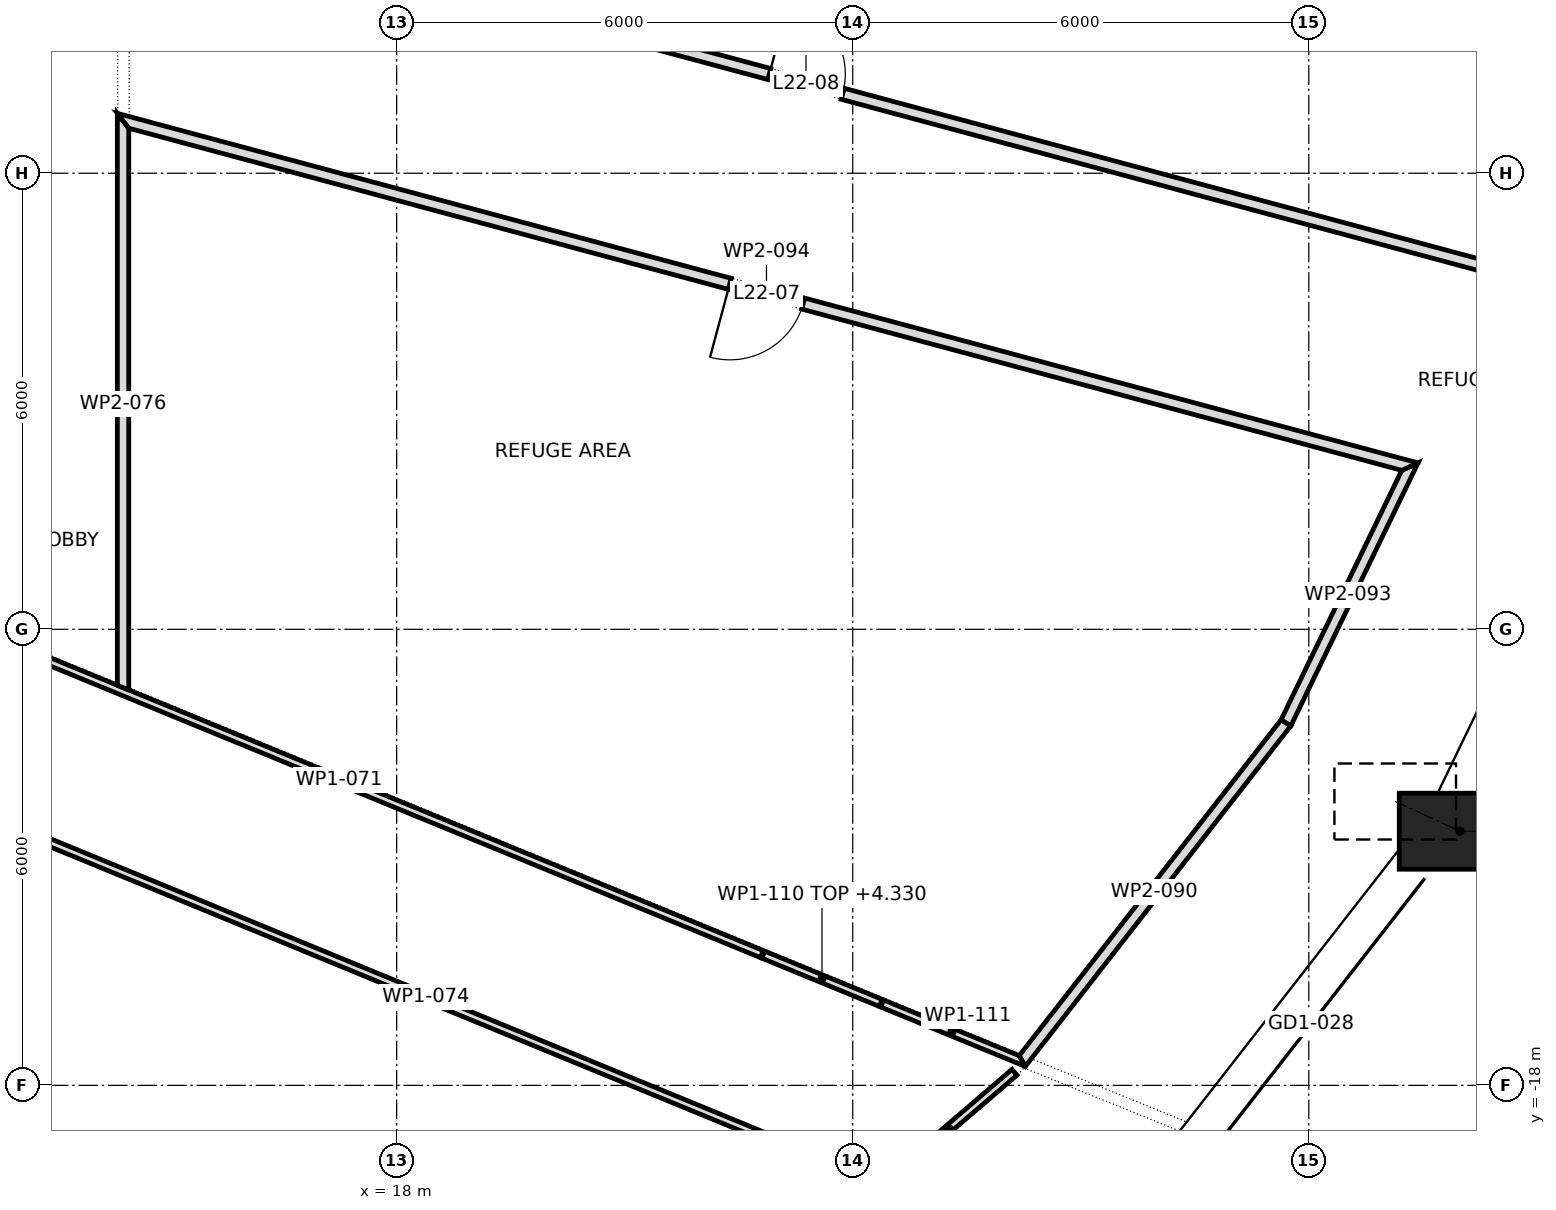
"""IFC4 building model, lengths in metres.
Left out: names, types, materials, properties, quantities, classifications, styles, units other than length and angle.
Written with IfcOpenShell. Run it as: python <this file> out.ifc"""

import sys

from ifc_helpers import new_model, si_unit, direction, frame, frame_2d, origin, origin_2d, place, context, subcontext, project, spatial, polyline, rectangle, outline, extrude, element, fill, save


model = new_model("IFC4")
c1 = context("Model", 3, precision=1e-05, world=origin(), true_north=direction((0.0, 1.0)))
c2 = subcontext(c1, "Body", "Model", "MODEL_VIEW")
j1 = project(units=[si_unit("LENGTHUNIT", "METRE"), si_unit("PLANEANGLEUNIT", "RADIAN")], contexts=[c1])
p1 = place(None, origin())
s1 = spatial("IfcSite", under=j1, at=p1, CompositionType="ELEMENT")
p2 = place(p1, origin())
s2 = spatial("IfcBuilding", under=s1, at=p2, CompositionType="ELEMENT")
p3 = place(p2, frame((0.0, 0.0, 99.1)))
s3 = spatial("IfcBuildingStorey", under=s2, at=p3, CompositionType="ELEMENT", Elevation=99.1)
p4 = place(p3, frame((28.04, -19.724, 0.086), z_axis=(-0.140981797412, 0.099170230088, 0.985032688931), x_axis=(-0.575341361803, -0.817913392358, 0.0)))
e1 = element("IfcColumn", 1, at=p4, inside=s3, PredefinedType="COLUMN", context=c2, shape_type="SweptSolid", body=[
    extrude(rectangle(XDim=1.6, YDim=1.0, at=origin_2d()), origin(), (0.0, 0.0, 1.0), 5.308),
])
p5 = place(p3, frame((31.99, -14.656, 0.088), z_axis=(-0.160721780276, 0.073644982891, 0.984248406572), x_axis=(-0.416565116305, -0.909105881555, 0.0)))
e2 = element("IfcColumn", 2, at=p5, inside=s3, PredefinedType="COLUMN", context=c2, shape_type="SweptSolid", body=[
    extrude(rectangle(XDim=1.6, YDim=1.0, at=origin_2d()), origin(), (0.0, 0.0, 1.0), 5.307),
])
p6 = place(p3, frame((9.76, -14.313, 0.0), z_axis=(0.0, 0.0, 1.0), x_axis=(0.493758679804, -0.869598968558, 0.0)))
e3 = element("IfcWall", 3, at=p6, inside=s3, PredefinedType="PARTITIONING", context=c2, shape_type="SweptSolid", body=[
    extrude(outline(polyline([(0.0, -0.075), (1.773, -0.075), (3.547, -0.075), (5.32, -0.075), (7.094, -0.075), (8.867, -0.075), (10.641, -0.075), (12.414, -0.075), (12.264, 0.075), (10.54, 0.075), (8.817, 0.075), (7.094, 0.075), (5.37, 0.075), (3.647, 0.075), (1.923, 0.075), (0.2, 0.075), (0.0, -0.075), (0.0, -0.075)])), origin(), (0.0, 0.0, 1.0), 5.1),
])
p7 = place(p3, frame((11.67, -11.7, 0.0), z_axis=(0.0, 0.0, 1.0), x_axis=(0.925020199912, -0.379917925025, 0.0)))
e4 = element("IfcWall", 4, at=p7, inside=s3, PredefinedType="PARTITIONING", context=c2, shape_type="SweptSolid", body=[
    extrude(outline(polyline([(0.0, 0.05), (0.0, -0.05), (1.721, -0.05), (3.442, -0.05), (5.163, -0.05), (6.884, -0.05), (8.605, -0.05), (10.326, -0.05), (12.047, -0.05), (12.047, 0.05), (10.326, 0.05), (8.605, 0.05), (6.884, 0.05), (5.163, 0.05), (3.442, 0.05), (1.721, 0.05), (0.0, 0.05)])), origin(), (0.0, 0.0, 1.0), 5.1),
])
p8 = place(p3, frame((12.441, -14.396, 0.0), z_axis=(0.0, 0.0, 1.0), x_axis=(0.924853269873, -0.380324110733, 0.0)))
e5 = element("IfcWall", 5, at=p8, inside=s3, PredefinedType="PARTITIONING", context=c2, shape_type="SweptSolid", body=[
    extrude(outline(polyline([(0.02, -0.05), (1.847, -0.05), (3.674, -0.05), (5.501, -0.05), (7.329, -0.05), (9.156, -0.05), (10.983, -0.05), (12.81, -0.05), (12.856, 0.041), (12.895, 0.021), (12.895, 0.037), (12.89, 0.04), (12.895, 0.049), (12.895, 0.05), (11.053, 0.05), (9.211, 0.05), (7.369, 0.05), (5.526, 0.05), (3.684, 0.05), (1.842, 0.05), (0.0, 0.05), (0.0, 0.05), (0.01, 0.0), (0.02, -0.05)])), origin(), (0.0, 0.0, 1.0), 5.1),
])
p9 = place(p3, frame((14.4, -5.212, 0.0), z_axis=(0.0, 0.0, 1.0), x_axis=(0.0, -1.0, 0.0)))
e6 = element("IfcWall", 6, at=p9, inside=s3, PredefinedType="PARTITIONING", context=c2, shape_type="SweptSolid", body=[
    extrude(outline(polyline([(0.0, -0.075), (1.881, -0.075), (3.762, -0.075), (5.643, -0.075), (7.524, -0.075), (7.585, 0.074), (7.585, 0.075), (5.738, 0.075), (3.89, 0.075), (2.043, 0.075), (0.196, 0.075), (0.098, 0.0), (0.0, -0.075), (0.0, -0.075), (0.0, -0.075), (0.0, -0.075)])), origin(), (0.0, 0.0, 1.0), 5.1),
])
p10 = place(p3, frame((14.344, -2.395, 0.0), z_axis=(0.0, 0.0, 1.0), x_axis=(0.96572282832, -0.259575458899, 0.0)))
e7 = element("IfcWall", 7, at=p10, inside=s3, PredefinedType="PARTITIONING", context=c2, shape_type="SweptSolid", body=[
    extrude(outline(polyline([(0.0, -0.075), (1.874, -0.075), (3.749, -0.075), (5.623, -0.075), (7.497, -0.075), (9.372, -0.075), (11.246, -0.075), (13.12, -0.075), (14.994, -0.075), (16.869, -0.075), (18.743, -0.075), (18.588, 0.075), (16.74, 0.075), (14.893, 0.075), (13.046, 0.075), (11.199, 0.075), (9.351, 0.075), (7.504, 0.075), (5.657, 0.075), (3.81, 0.075), (1.962, 0.075), (0.115, 0.075), (0.0, -0.075)])), origin(), (0.0, 0.0, 1.0), 5.1),
])
p11 = place(p10, frame((8.861, 0.0, 0.0)))
e8 = element("IfcOpeningElement", 8, at=p11, cuts=e7, PredefinedType="OPENING", context=c2, shape_type="SweptSolid", body=[
    extrude(rectangle(XDim=1.0, YDim=2.1, at=frame_2d((0.5, 1.05))), frame((0.0, 0.087, 0.0), z_axis=(0.0, -1.0, 0.0), x_axis=(1.0, 0.0, 0.0)), (0.0, 0.0, 1.0), 0.174),
])
p12 = place(p3, frame((24.399, -19.309, 0.0), z_axis=(0.0, 0.0, 1.0), x_axis=(0.759233893013, 0.650817866765, 0.0)))
e9 = element("IfcWall", 9, at=p12, inside=s3, PredefinedType="PARTITIONING", context=c2, shape_type="SweptSolid", body=[
    extrude(outline(polyline([(2.277, 0.05), (0.025, 0.05), (0.0, 0.038), (0.0, -0.05), (2.277, -0.05), (2.277, 0.05)])), origin(), (0.0, 0.0, 1.0), 5.1),
])
p13 = place(p3, frame((26.211, -17.704, 0.0), z_axis=(0.0, 0.0, 1.0), x_axis=(0.614915849889, 0.788592732375, 0.0)))
e10 = element("IfcWall", 10, at=p13, inside=s3, PredefinedType="PARTITIONING", context=c2, shape_type="SweptSolid", body=[
    extrude(outline(polyline([(0.0, -0.075), (1.894, -0.075), (3.788, -0.075), (5.682, -0.075), (5.666, 0.075), (3.798, 0.075), (1.93, 0.075), (0.062, 0.075), (0.0, -0.075)])), origin(), (0.0, 0.0, 1.0), 5.1),
])
p14 = place(p3, frame((29.697, -13.237, 0.0), z_axis=(0.0, 0.0, 1.0), x_axis=(0.435381547963, 0.900246026202, 0.0)))
e11 = element("IfcWall", 11, at=p14, inside=s3, PredefinedType="PARTITIONING", context=c2, shape_type="SweptSolid", body=[
    extrude(outline(polyline([(0.0, -0.075), (1.921, -0.075), (3.842, -0.075), (3.661, 0.075), (1.838, 0.075), (0.016, 0.075), (0.0, -0.075)])), origin(), (0.0, 0.0, 1.0), 5.1),
])
p15 = place(p3, frame((31.417, -9.884, 0.0), z_axis=(0.0, 0.0, 1.0), x_axis=(-0.965732064275, 0.259541095073, 0.0)))
e12 = element("IfcWall", 12, at=p15, inside=s3, PredefinedType="PARTITIONING", context=c2, shape_type="SweptSolid", body=[
    extrude(outline(polyline([(0.0, -0.075), (1.969, -0.075), (3.938, -0.075), (5.906, -0.075), (7.875, -0.075), (9.844, -0.075), (11.813, -0.075), (13.781, -0.075), (15.75, -0.075), (17.719, -0.075), (17.523, 0.075), (15.597, 0.075), (13.67, 0.075), (11.743, 0.075), (9.816, 0.075), (7.889, 0.075), (5.962, 0.075), (4.035, 0.075), (2.108, 0.075), (0.181, 0.075), (0.0, -0.075)])), origin(), (0.0, 0.0, 1.0), 5.1),
])
p16 = place(p15, frame((8.356, 0.0, 0.0)))
e13 = element("IfcOpeningElement", 13, at=p16, cuts=e12, PredefinedType="OPENING", context=c2, shape_type="SweptSolid", body=[
    extrude(rectangle(XDim=1.0, YDim=2.1, at=frame_2d((0.5, 1.05))), frame((0.0, 0.087, 0.0), z_axis=(0.0, -1.0, 0.0), x_axis=(1.0, 0.0, 0.0)), (0.0, 0.0, 1.0), 0.174),
])
p17 = place(p3, frame((22.814, -16.277, 0.0), z_axis=(0.0, 0.0, 1.0), x_axis=(0.925000784705, -0.37996519353, 0.0)))
e14 = element("IfcWall", 14, at=p17, inside=s3, PredefinedType="PARTITIONING", context=c2, shape_type="SweptSolid", body=[
    extrude(outline(polyline([(0.0, 0.05), (0.0, -0.05), (1.69, -0.05), (1.69, 0.05), (0.0, 0.05)])), origin(), (0.0, 0.0, 1.0), 4.33),
])
p18 = place(p3, frame((24.377, -16.919, 0.0), z_axis=(0.0, 0.0, 1.0), x_axis=(0.925015370033, -0.37992968455, 0.0)))
e15 = element("IfcWall", 15, at=p18, inside=s3, PredefinedType="PARTITIONING", context=c2, shape_type="SweptSolid", body=[
    extrude(outline(polyline([(2.067, -0.05), (2.067, -0.05), (1.939, 0.05), (0.0, 0.05), (0.0, -0.05), (2.067, -0.05)])), origin(), (0.0, 0.0, 1.0), 5.1),
])
p19 = place(p16, origin())
e16 = element("IfcDoor", 16, at=p19, inside=s3, OperationType="SINGLE_SWING_LEFT", PredefinedType="DOOR", context=c2, shape_type="SweptSolid", body=[
    extrude(rectangle(XDim=1.0, YDim=2.1, at=frame_2d((0.5, 1.05))), frame((0.0, 0.025, 0.0), z_axis=(0.0, -1.0, 0.0), x_axis=(1.0, 0.0, 0.0)), (0.0, 0.0, 1.0), 0.05),
])
fill(e13, e16)
p20 = place(p11, origin())
e17 = element("IfcDoor", 17, at=p20, inside=s3, OperationType="SINGLE_SWING_RIGHT", PredefinedType="DOOR", context=c2, shape_type="SweptSolid", body=[
    extrude(rectangle(XDim=1.0, YDim=2.1, at=frame_2d((0.5, 1.05))), frame((0.0, 0.025, 0.0), z_axis=(0.0, -1.0, 0.0), x_axis=(1.0, 0.0, 0.0)), (0.0, 0.0, 1.0), 0.05),
])
fill(e8, e17)
save(model, sys.argv[1])
